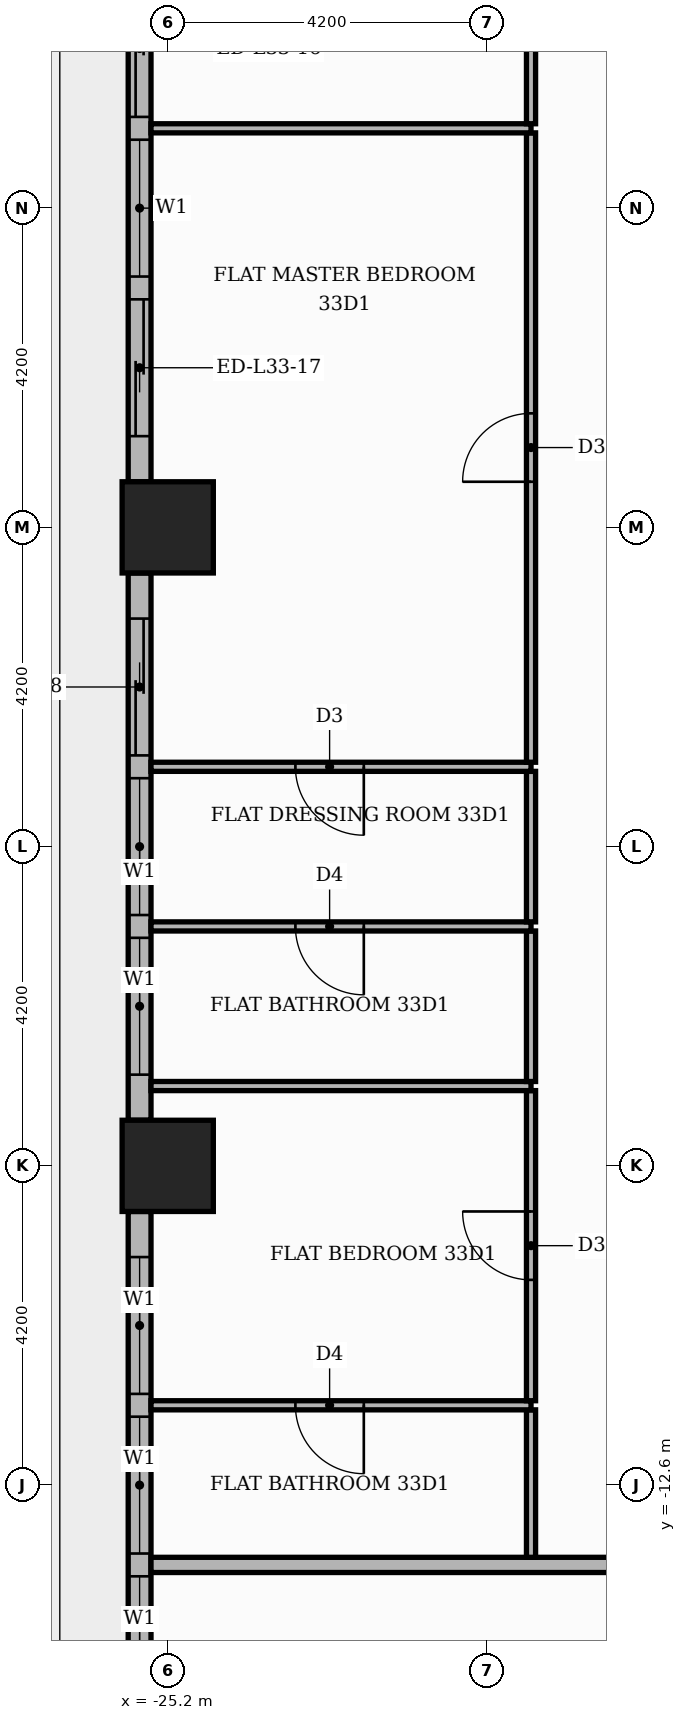
"""IFC4 building model, lengths in metres.
Left out: names, types, materials, properties, quantities, classifications, styles, units other than length and angle.
Written with IfcOpenShell. Run it as: python <this file> out.ifc"""

import sys

from ifc_helpers import new_model, si_unit, direction, frame, frame_2d, origin, origin_2d, place, context, subcontext, project, spatial, rectangle, extrude, element, fill, save


model = new_model("IFC4")
c1 = context("Model", 3, precision=1e-05, world=origin(), true_north=direction((0.0, 1.0)))
c2 = subcontext(c1, "Body", "Model", "MODEL_VIEW")
j1 = project(units=[si_unit("LENGTHUNIT", "METRE"), si_unit("PLANEANGLEUNIT", "RADIAN")], contexts=[c1])
p1 = place(None, origin())
s1 = spatial("IfcSite", under=j1, at=p1, CompositionType="ELEMENT")
p2 = place(p1, origin())
s2 = spatial("IfcBuilding", under=s1, at=p2, CompositionType="ELEMENT")
p3 = place(p2, frame((0.0, 0.0, 141.6)))
s3 = spatial("IfcBuildingStorey", under=s2, at=p3, CompositionType="ELEMENT", Elevation=141.6)
for number, where, z_axis, x_axis in (
    (1, (-25.2, 0.0, 0.0), (0.0, 0.0, 1.0), (1.0, 0.0, 0.0)),
    (2, (-25.2, -8.4, 0.0), (0.0, 0.0, 1.0), (1.0, 0.0, 0.0)),
):
    element("IfcColumn", number, at=place(p3, frame(where, z_axis=z_axis, x_axis=x_axis)), inside=s3, PredefinedType="COLUMN", context=c2, shape_type="SweptSolid", body=[
        extrude(rectangle(XDim=1.2, YDim=1.2, at=origin_2d()), origin(), (0.0, 0.0, 1.0), 3.9),
    ])
p4 = place(p3, frame((-25.57, 7.8, 0.0), z_axis=(0.0, 0.0, 1.0), x_axis=(0.0, -1.0, 0.0)))
e3 = element("IfcWall", 3, at=p4, inside=s3, PredefinedType="STANDARD", context=c2, shape_type="SweptSolid", body=[
    extrude(rectangle(XDim=7.2, YDim=0.3, at=frame_2d((3.6, 0.0))), origin(), (0.0, 0.0, 1.0), 3.48),
])
p5 = place(p4, frame((0.6, 0.0, 0.0)))
e4 = element("IfcOpeningElement", 4, at=p5, cuts=e3, PredefinedType="OPENING", context=c2, shape_type="SweptSolid", body=[
    extrude(rectangle(XDim=1.8, YDim=2.4, at=frame_2d((0.9, 1.2))), frame((0.0, 0.16, 0.0), z_axis=(0.0, -1.0, 0.0), x_axis=(1.0, 0.0, 0.0)), (0.0, 0.0, 1.0), 0.32),
])
p6 = place(p4, frame((2.7, 0.0, 0.9)))
e5 = element("IfcOpeningElement", 5, at=p6, cuts=e3, PredefinedType="OPENING", context=c2, shape_type="SweptSolid", body=[
    extrude(rectangle(XDim=1.8, YDim=2.1, at=frame_2d((0.9, 1.05))), frame((0.0, 0.16, 0.0), z_axis=(0.0, -1.0, 0.0), x_axis=(1.0, 0.0, 0.0)), (0.0, 0.0, 1.0), 0.32),
])
p7 = place(p4, frame((4.8, 0.0, 0.0)))
e6 = element("IfcOpeningElement", 6, at=p7, cuts=e3, PredefinedType="OPENING", context=c2, shape_type="SweptSolid", body=[
    extrude(rectangle(XDim=1.8, YDim=2.4, at=frame_2d((0.9, 1.2))), frame((0.0, 0.16, 0.0), z_axis=(0.0, -1.0, 0.0), x_axis=(1.0, 0.0, 0.0)), (0.0, 0.0, 1.0), 0.32),
])
p8 = place(p3, frame((-25.57, -0.6, 0.0), z_axis=(0.0, 0.0, 1.0), x_axis=(0.0, -1.0, 0.0)))
e7 = element("IfcWall", 7, at=p8, inside=s3, PredefinedType="STANDARD", context=c2, shape_type="SweptSolid", body=[
    extrude(rectangle(XDim=7.2, YDim=0.3, at=frame_2d((3.6, 0.0))), origin(), (0.0, 0.0, 1.0), 3.48),
])
p9 = place(p8, frame((0.6, 0.0, 0.0)))
e8 = element("IfcOpeningElement", 8, at=p9, cuts=e7, PredefinedType="OPENING", context=c2, shape_type="SweptSolid", body=[
    extrude(rectangle(XDim=1.8, YDim=2.4, at=frame_2d((0.9, 1.2))), frame((0.0, 0.16, 0.0), z_axis=(0.0, -1.0, 0.0), x_axis=(1.0, 0.0, 0.0)), (0.0, 0.0, 1.0), 0.32),
])
p10 = place(p8, frame((2.7, 0.0, 0.9)))
e9 = element("IfcOpeningElement", 9, at=p10, cuts=e7, PredefinedType="OPENING", context=c2, shape_type="SweptSolid", body=[
    extrude(rectangle(XDim=1.8, YDim=2.1, at=frame_2d((0.9, 1.05))), frame((0.0, 0.16, 0.0), z_axis=(0.0, -1.0, 0.0), x_axis=(1.0, 0.0, 0.0)), (0.0, 0.0, 1.0), 0.32),
])
p11 = place(p8, frame((4.8, 0.0, 0.9)))
e10 = element("IfcOpeningElement", 10, at=p11, cuts=e7, PredefinedType="OPENING", context=c2, shape_type="SweptSolid", body=[
    extrude(rectangle(XDim=1.8, YDim=2.1, at=frame_2d((0.9, 1.05))), frame((0.0, 0.16, 0.0), z_axis=(0.0, -1.0, 0.0), x_axis=(1.0, 0.0, 0.0)), (0.0, 0.0, 1.0), 0.32),
])
p12 = place(p3, frame((-25.57, -9.0, 0.0), z_axis=(0.0, 0.0, 1.0), x_axis=(0.0, -1.0, 0.0)))
e11 = element("IfcWall", 11, at=p12, inside=s3, PredefinedType="STANDARD", context=c2, shape_type="SweptSolid", body=[
    extrude(rectangle(XDim=7.2, YDim=0.3, at=frame_2d((3.6, 0.0))), origin(), (0.0, 0.0, 1.0), 3.48),
])
p13 = place(p12, frame((0.6, 0.0, 0.9)))
e12 = element("IfcOpeningElement", 12, at=p13, cuts=e11, PredefinedType="OPENING", context=c2, shape_type="SweptSolid", body=[
    extrude(rectangle(XDim=1.8, YDim=2.1, at=frame_2d((0.9, 1.05))), frame((0.0, 0.16, 0.0), z_axis=(0.0, -1.0, 0.0), x_axis=(1.0, 0.0, 0.0)), (0.0, 0.0, 1.0), 0.32),
])
p14 = place(p12, frame((2.7, 0.0, 0.9)))
e13 = element("IfcOpeningElement", 13, at=p14, cuts=e11, PredefinedType="OPENING", context=c2, shape_type="SweptSolid", body=[
    extrude(rectangle(XDim=1.8, YDim=2.1, at=frame_2d((0.9, 1.05))), frame((0.0, 0.16, 0.0), z_axis=(0.0, -1.0, 0.0), x_axis=(1.0, 0.0, 0.0)), (0.0, 0.0, 1.0), 0.32),
])
p15 = place(p12, frame((4.8, 0.0, 0.9)))
e14 = element("IfcOpeningElement", 14, at=p15, cuts=e11, PredefinedType="OPENING", context=c2, shape_type="SweptSolid", body=[
    extrude(rectangle(XDim=1.8, YDim=2.1, at=frame_2d((0.9, 1.05))), frame((0.0, 0.16, 0.0), z_axis=(0.0, -1.0, 0.0), x_axis=(1.0, 0.0, 0.0)), (0.0, 0.0, 1.0), 0.32),
])
p16 = place(p3, frame((-25.42, -13.65, 0.0), z_axis=(0.0, 0.0, 1.0), x_axis=(1.0, 0.0, 0.0)))
e15 = element("IfcWall", 15, at=p16, inside=s3, PredefinedType="PARTITIONING", context=c2, shape_type="SweptSolid", body=[
    extrude(rectangle(XDim=39.07, YDim=0.2, at=frame_2d((19.535, 0.0))), origin(), (0.0, 0.0, 1.0), 3.48),
])
p17 = place(p16, frame((13.32, 0.0, 0.0)))
e16 = element("IfcOpeningElement", 16, at=p17, cuts=e15, PredefinedType="OPENING", context=c2, shape_type="SweptSolid", body=[
    extrude(rectangle(XDim=1.1, YDim=2.4, at=frame_2d((0.55, 1.2))), frame((0.0, 0.11, 0.0), z_axis=(0.0, -1.0, 0.0), x_axis=(1.0, 0.0, 0.0)), (0.0, 0.0, 1.0), 0.22),
])
p18 = place(p16, frame((25.92, 0.0, 0.0)))
e17 = element("IfcOpeningElement", 17, at=p18, cuts=e15, PredefinedType="OPENING", context=c2, shape_type="SweptSolid", body=[
    extrude(rectangle(XDim=1.1, YDim=2.4, at=frame_2d((0.55, 1.2))), frame((0.0, 0.11, 0.0), z_axis=(0.0, -1.0, 0.0), x_axis=(1.0, 0.0, 0.0)), (0.0, 0.0, 1.0), 0.22),
])
p19 = place(p3, frame((-20.42, -13.55, 0.0), z_axis=(0.0, 0.0, 1.0), x_axis=(0.0, 1.0, 0.0)))
e18 = element("IfcWall", 18, at=p19, inside=s3, PredefinedType="PARTITIONING", context=c2, shape_type="SweptSolid", body=[
    extrude(rectangle(XDim=1.94, YDim=0.12, at=frame_2d((0.97, 0.0))), origin(), (0.0, 0.0, 1.0), 3.48),
])
p20 = place(p3, frame((-25.42, -11.55, 0.0), z_axis=(0.0, 0.0, 1.0), x_axis=(1.0, 0.0, 0.0)))
e19 = element("IfcWall", 19, at=p20, inside=s3, PredefinedType="PARTITIONING", context=c2, shape_type="SweptSolid", body=[
    extrude(rectangle(XDim=5.0, YDim=0.12, at=frame_2d((2.5, 0.0))), origin(), (0.0, 0.0, 1.0), 3.48),
])
p21 = place(p20, frame((1.9, 0.0, 0.0)))
e20 = element("IfcOpeningElement", 20, at=p21, cuts=e19, PredefinedType="OPENING", context=c2, shape_type="SweptSolid", body=[
    extrude(rectangle(XDim=0.9, YDim=2.1, at=frame_2d((0.45, 1.05))), frame((0.0, 0.07, 0.0), z_axis=(0.0, -1.0, 0.0), x_axis=(1.0, 0.0, 0.0)), (0.0, 0.0, 1.0), 0.14),
])
p22 = place(p3, frame((-20.42, -11.49, 0.0), z_axis=(0.0, 0.0, 1.0), x_axis=(0.0, 1.0, 0.0)))
e21 = element("IfcWall", 21, at=p22, inside=s3, PredefinedType="PARTITIONING", context=c2, shape_type="SweptSolid", body=[
    extrude(rectangle(XDim=4.08, YDim=0.12, at=frame_2d((2.04, 0.0))), origin(), (0.0, 0.0, 1.0), 3.48),
])
p23 = place(p22, frame((1.59, 0.0, 0.0)))
e22 = element("IfcOpeningElement", 22, at=p23, cuts=e21, PredefinedType="OPENING", context=c2, shape_type="SweptSolid", body=[
    extrude(rectangle(XDim=0.9, YDim=2.1, at=frame_2d((0.45, 1.05))), frame((0.0, 0.07, 0.0), z_axis=(0.0, -1.0, 0.0), x_axis=(1.0, 0.0, 0.0)), (0.0, 0.0, 1.0), 0.14),
])
p24 = place(p3, frame((-25.42, -7.35, 0.0), z_axis=(0.0, 0.0, 1.0), x_axis=(1.0, 0.0, 0.0)))
e23 = element("IfcWall", 23, at=p24, inside=s3, PredefinedType="PARTITIONING", context=c2, shape_type="SweptSolid", body=[
    extrude(rectangle(XDim=5.0, YDim=0.12, at=frame_2d((2.5, 0.0))), origin(), (0.0, 0.0, 1.0), 3.48),
])
p25 = place(p3, frame((-20.42, -7.29, 0.0), z_axis=(0.0, 0.0, 1.0), x_axis=(0.0, 1.0, 0.0)))
e24 = element("IfcWall", 24, at=p25, inside=s3, PredefinedType="PARTITIONING", context=c2, shape_type="SweptSolid", body=[
    extrude(rectangle(XDim=1.98, YDim=0.12, at=frame_2d((0.99, 0.0))), origin(), (0.0, 0.0, 1.0), 3.48),
])
p26 = place(p3, frame((-25.42, -5.25, 0.0), z_axis=(0.0, 0.0, 1.0), x_axis=(1.0, 0.0, 0.0)))
e25 = element("IfcWall", 25, at=p26, inside=s3, PredefinedType="PARTITIONING", context=c2, shape_type="SweptSolid", body=[
    extrude(rectangle(XDim=5.0, YDim=0.12, at=frame_2d((2.5, 0.0))), origin(), (0.0, 0.0, 1.0), 3.48),
])
p27 = place(p26, frame((1.9, 0.0, 0.0)))
e26 = element("IfcOpeningElement", 26, at=p27, cuts=e25, PredefinedType="OPENING", context=c2, shape_type="SweptSolid", body=[
    extrude(rectangle(XDim=0.9, YDim=2.1, at=frame_2d((0.45, 1.05))), frame((0.0, 0.07, 0.0), z_axis=(0.0, -1.0, 0.0), x_axis=(1.0, 0.0, 0.0)), (0.0, 0.0, 1.0), 0.14),
])
p28 = place(p3, frame((-20.42, -5.19, 0.0), z_axis=(0.0, 0.0, 1.0), x_axis=(0.0, 1.0, 0.0)))
e27 = element("IfcWall", 27, at=p28, inside=s3, PredefinedType="PARTITIONING", context=c2, shape_type="SweptSolid", body=[
    extrude(rectangle(XDim=1.98, YDim=0.12, at=frame_2d((0.99, 0.0))), origin(), (0.0, 0.0, 1.0), 3.48),
])
p29 = place(p3, frame((-25.42, -3.15, 0.0), z_axis=(0.0, 0.0, 1.0), x_axis=(1.0, 0.0, 0.0)))
e28 = element("IfcWall", 28, at=p29, inside=s3, PredefinedType="PARTITIONING", context=c2, shape_type="SweptSolid", body=[
    extrude(rectangle(XDim=5.0, YDim=0.12, at=frame_2d((2.5, 0.0))), origin(), (0.0, 0.0, 1.0), 3.48),
])
p30 = place(p29, frame((1.9, 0.0, 0.0)))
e29 = element("IfcOpeningElement", 29, at=p30, cuts=e28, PredefinedType="OPENING", context=c2, shape_type="SweptSolid", body=[
    extrude(rectangle(XDim=0.9, YDim=2.1, at=frame_2d((0.45, 1.05))), frame((0.0, 0.07, 0.0), z_axis=(0.0, -1.0, 0.0), x_axis=(1.0, 0.0, 0.0)), (0.0, 0.0, 1.0), 0.14),
])
p31 = place(p3, frame((-20.42, -3.09, 0.0), z_axis=(0.0, 0.0, 1.0), x_axis=(0.0, 1.0, 0.0)))
e30 = element("IfcWall", 30, at=p31, inside=s3, PredefinedType="PARTITIONING", context=c2, shape_type="SweptSolid", body=[
    extrude(rectangle(XDim=8.28, YDim=0.12, at=frame_2d((4.14, 0.0))), origin(), (0.0, 0.0, 1.0), 3.48),
])
p32 = place(p31, frame((3.69, 0.0, 0.0)))
e31 = element("IfcOpeningElement", 31, at=p32, cuts=e30, PredefinedType="OPENING", context=c2, shape_type="SweptSolid", body=[
    extrude(rectangle(XDim=0.9, YDim=2.1, at=frame_2d((0.45, 1.05))), frame((0.0, 0.07, 0.0), z_axis=(0.0, -1.0, 0.0), x_axis=(1.0, 0.0, 0.0)), (0.0, 0.0, 1.0), 0.14),
])
p33 = place(p3, frame((-25.42, 5.25, 0.0), z_axis=(0.0, 0.0, 1.0), x_axis=(1.0, 0.0, 0.0)))
e32 = element("IfcWall", 32, at=p33, inside=s3, PredefinedType="PARTITIONING", context=c2, shape_type="SweptSolid", body=[
    extrude(rectangle(XDim=5.0, YDim=0.12, at=frame_2d((2.5, 0.0))), origin(), (0.0, 0.0, 1.0), 3.48),
])
p34 = place(p3, frame((-20.42, 5.31, 0.0), z_axis=(0.0, 0.0, 1.0), x_axis=(0.0, 1.0, 0.0)))
e33 = element("IfcWall", 33, at=p34, inside=s3, PredefinedType="PARTITIONING", context=c2, shape_type="SweptSolid", body=[
    extrude(rectangle(XDim=6.18, YDim=0.12, at=frame_2d((3.09, 0.0))), origin(), (0.0, 0.0, 1.0), 3.48),
])
p35 = place(p34, frame((2.59, 0.0, 0.0)))
e34 = element("IfcOpeningElement", 34, at=p35, cuts=e33, PredefinedType="OPENING", context=c2, shape_type="SweptSolid", body=[
    extrude(rectangle(XDim=1.0, YDim=2.1, at=frame_2d((0.5, 1.05))), frame((0.0, 0.07, 0.0), z_axis=(0.0, -1.0, 0.0), x_axis=(1.0, 0.0, 0.0)), (0.0, 0.0, 1.0), 0.14),
])
p36 = place(p5, origin())
e35 = element("IfcDoor", 35, at=p36, inside=s3, OperationType="SLIDING_TO_LEFT", PredefinedType="DOOR", context=c2, shape_type="SweptSolid", body=[
    extrude(rectangle(XDim=1.8, YDim=2.4, at=frame_2d((0.9, 1.2))), frame((0.0, 0.025, 0.0), z_axis=(0.0, -1.0, 0.0), x_axis=(1.0, 0.0, 0.0)), (0.0, 0.0, 1.0), 0.05),
])
fill(e4, e35)
p37 = place(p6, origin())
e36 = element("IfcWindow", 36, at=p37, inside=s3, PartitioningType="SINGLE_PANEL", PredefinedType="WINDOW", context=c2, shape_type="SweptSolid", body=[
    extrude(rectangle(XDim=1.8, YDim=2.1, at=frame_2d((0.9, 1.05))), frame((0.0, 0.03, 0.0), z_axis=(0.0, -1.0, 0.0), x_axis=(1.0, 0.0, 0.0)), (0.0, 0.0, 1.0), 0.06),
])
fill(e5, e36)
p38 = place(p7, origin())
e37 = element("IfcDoor", 37, at=p38, inside=s3, OperationType="SLIDING_TO_RIGHT", PredefinedType="DOOR", context=c2, shape_type="SweptSolid", body=[
    extrude(rectangle(XDim=1.8, YDim=2.4, at=frame_2d((0.9, 1.2))), frame((0.0, 0.025, 0.0), z_axis=(0.0, -1.0, 0.0), x_axis=(1.0, 0.0, 0.0)), (0.0, 0.0, 1.0), 0.05),
])
fill(e6, e37)
p39 = place(p9, origin())
e38 = element("IfcDoor", 38, at=p39, inside=s3, OperationType="SLIDING_TO_LEFT", PredefinedType="DOOR", context=c2, shape_type="SweptSolid", body=[
    extrude(rectangle(XDim=1.8, YDim=2.4, at=frame_2d((0.9, 1.2))), frame((0.0, 0.025, 0.0), z_axis=(0.0, -1.0, 0.0), x_axis=(1.0, 0.0, 0.0)), (0.0, 0.0, 1.0), 0.05),
])
fill(e8, e38)
p40 = place(p10, origin())
e39 = element("IfcWindow", 39, at=p40, inside=s3, PartitioningType="SINGLE_PANEL", PredefinedType="WINDOW", context=c2, shape_type="SweptSolid", body=[
    extrude(rectangle(XDim=1.8, YDim=2.1, at=frame_2d((0.9, 1.05))), frame((0.0, 0.03, 0.0), z_axis=(0.0, -1.0, 0.0), x_axis=(1.0, 0.0, 0.0)), (0.0, 0.0, 1.0), 0.06),
])
fill(e9, e39)
p41 = place(p11, origin())
e40 = element("IfcWindow", 40, at=p41, inside=s3, PartitioningType="SINGLE_PANEL", PredefinedType="WINDOW", context=c2, shape_type="SweptSolid", body=[
    extrude(rectangle(XDim=1.8, YDim=2.1, at=frame_2d((0.9, 1.05))), frame((0.0, 0.03, 0.0), z_axis=(0.0, -1.0, 0.0), x_axis=(1.0, 0.0, 0.0)), (0.0, 0.0, 1.0), 0.06),
])
fill(e10, e40)
p42 = place(p13, origin())
e41 = element("IfcWindow", 41, at=p42, inside=s3, PartitioningType="SINGLE_PANEL", PredefinedType="WINDOW", context=c2, shape_type="SweptSolid", body=[
    extrude(rectangle(XDim=1.8, YDim=2.1, at=frame_2d((0.9, 1.05))), frame((0.0, 0.03, 0.0), z_axis=(0.0, -1.0, 0.0), x_axis=(1.0, 0.0, 0.0)), (0.0, 0.0, 1.0), 0.06),
])
fill(e12, e41)
p43 = place(p14, origin())
e42 = element("IfcWindow", 42, at=p43, inside=s3, PartitioningType="SINGLE_PANEL", PredefinedType="WINDOW", context=c2, shape_type="SweptSolid", body=[
    extrude(rectangle(XDim=1.8, YDim=2.1, at=frame_2d((0.9, 1.05))), frame((0.0, 0.03, 0.0), z_axis=(0.0, -1.0, 0.0), x_axis=(1.0, 0.0, 0.0)), (0.0, 0.0, 1.0), 0.06),
])
fill(e13, e42)
p44 = place(p15, origin())
e43 = element("IfcWindow", 43, at=p44, inside=s3, PartitioningType="SINGLE_PANEL", PredefinedType="WINDOW", context=c2, shape_type="SweptSolid", body=[
    extrude(rectangle(XDim=1.8, YDim=2.1, at=frame_2d((0.9, 1.05))), frame((0.0, 0.03, 0.0), z_axis=(0.0, -1.0, 0.0), x_axis=(1.0, 0.0, 0.0)), (0.0, 0.0, 1.0), 0.06),
])
fill(e14, e43)
p45 = place(p32, origin())
e44 = element("IfcDoor", 44, at=p45, inside=s3, OperationType="SINGLE_SWING_LEFT", PredefinedType="DOOR", context=c2, shape_type="SweptSolid", body=[
    extrude(rectangle(XDim=0.9, YDim=2.1, at=frame_2d((0.45, 1.05))), frame((0.0, 0.025, 0.0), z_axis=(0.0, -1.0, 0.0), x_axis=(1.0, 0.0, 0.0)), (0.0, 0.0, 1.0), 0.05),
])
fill(e31, e44)
p46 = place(p30, frame((0.9, 0.0, 0.0), z_axis=(0.0, 0.0, 1.0), x_axis=(-1.0, 0.0, 0.0)))
e45 = element("IfcDoor", 45, at=p46, inside=s3, OperationType="SINGLE_SWING_RIGHT", PredefinedType="DOOR", context=c2, shape_type="SweptSolid", body=[
    extrude(rectangle(XDim=0.9, YDim=2.1, at=frame_2d((0.45, 1.05))), frame((0.0, 0.025, 0.0), z_axis=(0.0, -1.0, 0.0), x_axis=(1.0, 0.0, 0.0)), (0.0, 0.0, 1.0), 0.05),
])
fill(e29, e45)
p47 = place(p27, frame((0.9, 0.0, 0.0), z_axis=(0.0, 0.0, 1.0), x_axis=(-1.0, 0.0, 0.0)))
e46 = element("IfcDoor", 46, at=p47, inside=s3, OperationType="SINGLE_SWING_RIGHT", PredefinedType="DOOR", context=c2, shape_type="SweptSolid", body=[
    extrude(rectangle(XDim=0.9, YDim=2.1, at=frame_2d((0.45, 1.05))), frame((0.0, 0.025, 0.0), z_axis=(0.0, -1.0, 0.0), x_axis=(1.0, 0.0, 0.0)), (0.0, 0.0, 1.0), 0.05),
])
fill(e26, e46)
p48 = place(p23, origin())
e47 = element("IfcDoor", 47, at=p48, inside=s3, OperationType="SINGLE_SWING_RIGHT", PredefinedType="DOOR", context=c2, shape_type="SweptSolid", body=[
    extrude(rectangle(XDim=0.9, YDim=2.1, at=frame_2d((0.45, 1.05))), frame((0.0, 0.025, 0.0), z_axis=(0.0, -1.0, 0.0), x_axis=(1.0, 0.0, 0.0)), (0.0, 0.0, 1.0), 0.05),
])
fill(e22, e47)
p49 = place(p21, frame((0.9, 0.0, 0.0), z_axis=(0.0, 0.0, 1.0), x_axis=(-1.0, 0.0, 0.0)))
e48 = element("IfcDoor", 48, at=p49, inside=s3, OperationType="SINGLE_SWING_RIGHT", PredefinedType="DOOR", context=c2, shape_type="SweptSolid", body=[
    extrude(rectangle(XDim=0.9, YDim=2.1, at=frame_2d((0.45, 1.05))), frame((0.0, 0.025, 0.0), z_axis=(0.0, -1.0, 0.0), x_axis=(1.0, 0.0, 0.0)), (0.0, 0.0, 1.0), 0.05),
])
fill(e20, e48)
save(model, sys.argv[1])
